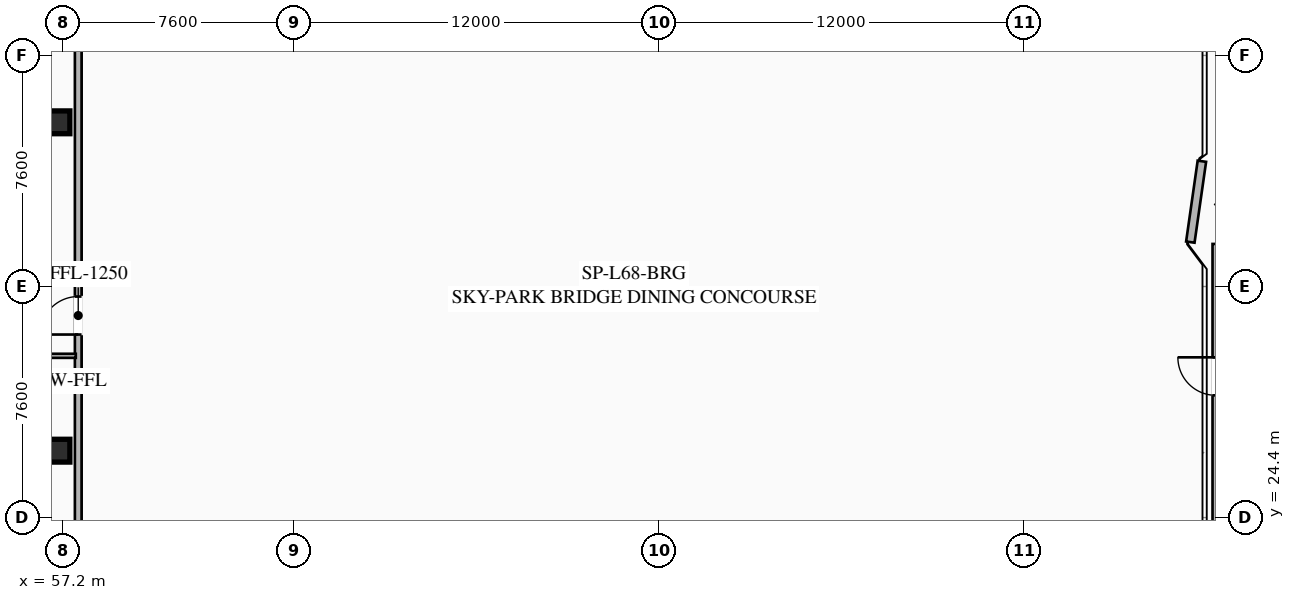
"""IFC4 building model, lengths in metres.
Left out: names, types, materials, properties, quantities, classifications, styles, units other than length and angle.
Written with IfcOpenShell. Run it as: python <this file> out.ifc"""

import sys

from ifc_helpers import new_model, si_unit, direction, frame, frame_2d, origin, origin_2d, place, context, subcontext, project, spatial, rectangle, hollow_rectangle, extrude, element, fill, save


model = new_model("IFC4")
c1 = context("Model", 3, precision=1e-05, world=origin(), true_north=direction((0.0, 1.0)))
c2 = subcontext(c1, "Body", "Model", "MODEL_VIEW")
j1 = project(units=[si_unit("LENGTHUNIT", "METRE"), si_unit("PLANEANGLEUNIT", "RADIAN")], contexts=[c1])
p1 = place(None, origin())
s1 = spatial("IfcSite", under=j1, at=p1, CompositionType="ELEMENT")
p2 = place(p1, origin())
s2 = spatial("IfcBuilding", under=s1, at=p2, CompositionType="ELEMENT")
p3 = place(p2, frame((0.0, 0.0, 251.4)))
s3 = spatial("IfcBuildingStorey", under=s2, at=p3, CompositionType="ELEMENT", Elevation=251.4)
for number, where, z_axis, x_axis in (
    (1, (57.05, 26.6, 0.0), (0.0, 0.0, 1.0), (1.0, 0.0, 0.0)),
    (2, (57.05, 37.4, 0.0), (0.0, 0.0, 1.0), (1.0, 0.0, 0.0)),
):
    element("IfcColumn", number, at=place(p3, frame(where, z_axis=z_axis, x_axis=x_axis)), inside=s3, PredefinedType="COLUMN", context=c2, shape_type="SweptSolid", body=[
        extrude(hollow_rectangle(XDim=0.75, YDim=0.75, WallThickness=0.032, at=origin_2d()), origin(), (0.0, 0.0, 1.0), 3.78),
    ])
p4 = place(p3, frame((94.28, 33.46, 0.0), z_axis=(0.0, 0.0, 1.0), x_axis=(0.141370477216, 0.989956760759, 0.0)))
e3 = element("IfcWall", 3, at=p4, inside=s3, PredefinedType="SOLIDWALL", context=c2, shape_type="SweptSolid", body=[
    extrude(rectangle(XDim=2.687, YDim=0.28, at=frame_2d((1.344, 0.0))), origin(), (0.0, 0.0, 1.0), 2.96),
])
p5 = place(p3, frame((57.7, 24.22, 0.0), z_axis=(0.0, 0.0, 1.0), x_axis=(0.0, 1.0, 0.0)))
e4 = element("IfcWall", 4, at=p5, inside=s3, PredefinedType="SOLIDWALL", context=c2, shape_type="SweptSolid", body=[
    extrude(rectangle(XDim=15.56, YDim=0.22, at=frame_2d((7.78, 0.0))), origin(), (0.0, 0.0, 1.0), 2.971),
])
p6 = place(p5, frame((6.2, 0.0, 0.0)))
e5 = element("IfcOpeningElement", 5, at=p6, cuts=e4, PredefinedType="OPENING", context=c2, shape_type="SweptSolid", body=[
    extrude(rectangle(XDim=1.25, YDim=2.25, at=frame_2d((0.625, 1.125))), frame((0.0, 0.12, 0.0), z_axis=(0.0, -1.0, 0.0), x_axis=(1.0, 0.0, 0.0)), (0.0, 0.0, 1.0), 0.24),
])
p7 = place(p3, frame((95.12, 24.22, 0.0), z_axis=(0.0, 0.0, 1.0), x_axis=(0.0, 1.0, 0.0)))
e6 = element("IfcWall", 6, at=p7, inside=s3, PredefinedType="SOLIDWALL", context=c2, shape_type="SweptSolid", body=[
    extrude(rectangle(XDim=9.18, YDim=0.22, at=frame_2d((4.59, 0.0))), origin(), (0.0, 0.0, 1.0), 2.971),
])
p8 = place(p7, frame((4.2, 0.0, 0.0)))
e7 = element("IfcOpeningElement", 7, at=p8, cuts=e6, PredefinedType="OPENING", context=c2, shape_type="SweptSolid", body=[
    extrude(rectangle(XDim=1.25, YDim=2.25, at=frame_2d((0.625, 1.125))), frame((0.0, 0.12, 0.0), z_axis=(0.0, -1.0, 0.0), x_axis=(1.0, 0.0, 0.0)), (0.0, 0.0, 1.0), 0.24),
])
for number, where, z_axis, x_axis in (
    (8, (53.03, 32.48, 0.0), (0.0, 0.0, 1.0), (1.0, 0.0, 0.0)),
    (9, (57.62, 29.72, 0.0), (0.0, 0.0, 1.0), (-1.0, 0.0, 0.0)),
):
    element("IfcWall", number, at=place(p3, frame(where, z_axis=z_axis, x_axis=x_axis)), inside=s3, PredefinedType="PARTITIONING", context=c2, shape_type="SweptSolid", body=[
        extrude(rectangle(XDim=4.59, YDim=0.135, at=frame_2d((2.295, 0.0))), origin(), (0.0, 0.0, 1.0), 2.971),
    ])
p9 = place(p6, origin())
e10 = element("IfcDoor", 10, at=p9, inside=s3, OperationType="SINGLE_SWING_LEFT", PredefinedType="DOOR", context=c2, shape_type="SweptSolid", body=[
    extrude(rectangle(XDim=1.25, YDim=2.25, at=frame_2d((0.625, 1.125))), frame((0.0, 0.025, 0.0), z_axis=(0.0, -1.0, 0.0), x_axis=(1.0, 0.0, 0.0)), (0.0, 0.0, 1.0), 0.05),
])
fill(e5, e10)
p10 = place(p8, origin())
e11 = element("IfcDoor", 11, at=p10, inside=s3, OperationType="SINGLE_SWING_RIGHT", PredefinedType="DOOR", context=c2, shape_type="SweptSolid", body=[
    extrude(rectangle(XDim=1.25, YDim=2.25, at=frame_2d((0.625, 1.125))), frame((0.0, 0.025, 0.0), z_axis=(0.0, -1.0, 0.0), x_axis=(1.0, 0.0, 0.0)), (0.0, 0.0, 1.0), 0.05),
])
fill(e7, e11)
save(model, sys.argv[1])
